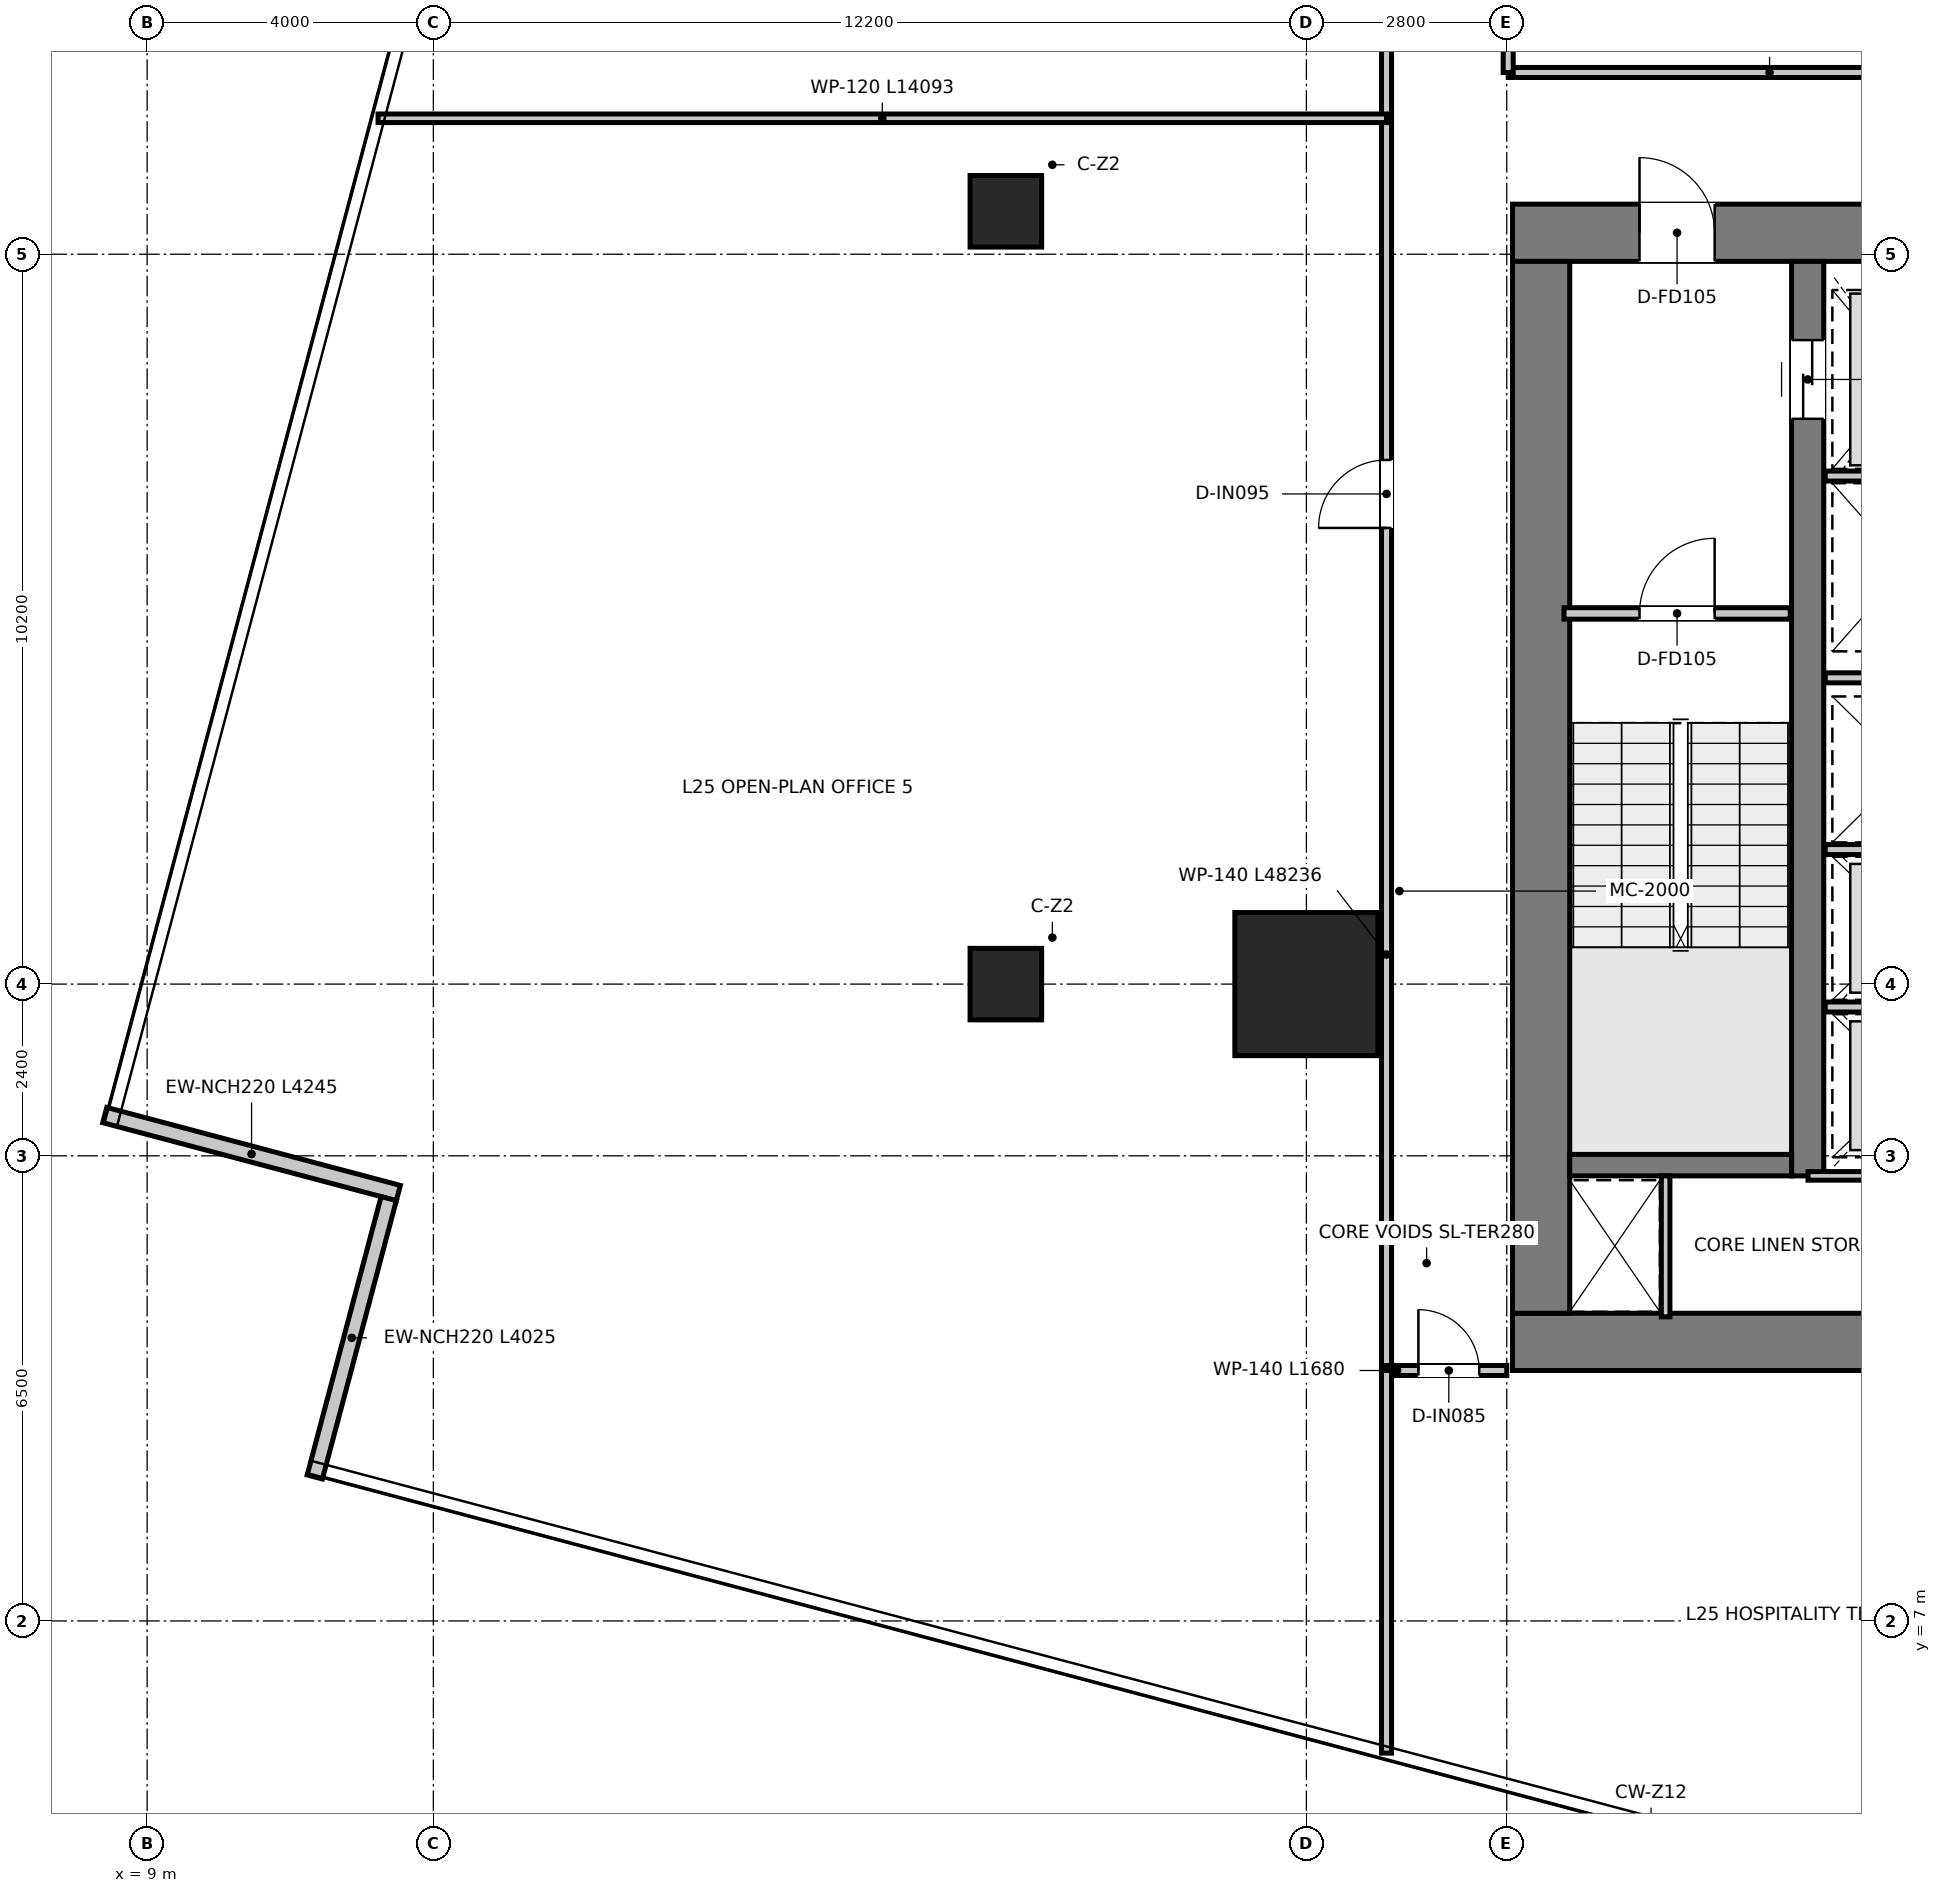
"""IFC4 building model, lengths in metres.
Left out: names, types, materials, properties, quantities, classifications, styles, units other than length and angle.
Written with IfcOpenShell. Run it as: python <this file> out.ifc"""

import sys

from ifc_helpers import new_model, si_unit, direction, frame, frame_2d, origin, origin_2d, place, context, subcontext, project, spatial, rectangle, extrude, source, transform, mapped, element, fill, save


model = new_model("IFC4")
c1 = context("Model", 3, precision=1e-05, world=origin(), true_north=direction((0.0, 1.0)))
c2 = subcontext(c1, "Body", "Model", "MODEL_VIEW")
j1 = project(units=[si_unit("LENGTHUNIT", "METRE"), si_unit("PLANEANGLEUNIT", "RADIAN")], contexts=[c1])
p1 = place(None, origin())
s1 = spatial("IfcSite", under=j1, at=p1, CompositionType="ELEMENT")
p2 = place(p1, origin())
s2 = spatial("IfcBuilding", under=s1, at=p2, CompositionType="ELEMENT")
p3 = place(p2, frame((0.0, 0.0, 105.85)))
s3 = spatial("IfcBuildingStorey", under=s2, at=p3, CompositionType="ELEMENT", Elevation=105.85)
p4 = place(p3, frame((28.08, 10.9, 0.0), z_axis=(0.0, 0.0, 1.0), x_axis=(1.0, 0.0, 0.0)))
e1 = element("IfcWall", 1, at=p4, inside=s3, PredefinedType="SHEAR", context=c2, shape_type="SweptSolid", body=[
    extrude(rectangle(XDim=15.84, YDim=0.8, at=frame_2d((7.92, 0.0))), origin(), (0.0, 0.0, 1.0), 3.95),
])
p5 = place(p3, frame((28.08, 26.4, 0.0), z_axis=(0.0, 0.0, 1.0), x_axis=(1.0, 0.0, 0.0)))
e2 = element("IfcWall", 2, at=p5, inside=s3, PredefinedType="SHEAR", context=c2, shape_type="SweptSolid", body=[
    extrude(rectangle(XDim=15.84, YDim=0.8, at=frame_2d((7.92, 0.0))), origin(), (0.0, 0.0, 1.0), 3.95),
])
p6 = place(p5, frame((7.22, 0.0, 0.0)))
e3 = element("IfcOpeningElement", 3, at=p6, cuts=e2, PredefinedType="OPENING", context=c2, shape_type="SweptSolid", body=[
    extrude(rectangle(XDim=1.4, YDim=2.2, at=frame_2d((0.7, 1.1))), frame((0.0, 0.41, 0.0), z_axis=(0.0, -1.0, 0.0), x_axis=(1.0, 0.0, 0.0)), (0.0, 0.0, 1.0), 0.82),
])
p7 = place(p5, frame((1.775, 0.0, 0.0)))
e4 = element("IfcOpeningElement", 4, at=p7, cuts=e2, PredefinedType="OPENING", context=c2, shape_type="SweptSolid", body=[
    extrude(rectangle(XDim=1.05, YDim=2.1, at=frame_2d((0.525, 1.05))), frame((0.0, 0.41, 0.0), z_axis=(0.0, -1.0, 0.0), x_axis=(1.0, 0.0, 0.0)), (0.0, 0.0, 1.0), 0.82),
])
p8 = place(p5, frame((13.015, 0.0, 0.0)))
e5 = element("IfcOpeningElement", 5, at=p8, cuts=e2, PredefinedType="OPENING", context=c2, shape_type="SweptSolid", body=[
    extrude(rectangle(XDim=1.05, YDim=2.1, at=frame_2d((0.525, 1.05))), frame((0.0, 0.41, 0.0), z_axis=(0.0, -1.0, 0.0), x_axis=(1.0, 0.0, 0.0)), (0.0, 0.0, 1.0), 0.82),
])
p9 = place(p3, frame((28.48, 11.3, 0.0), z_axis=(0.0, 0.0, 1.0), x_axis=(0.0, 1.0, 0.0)))
e6 = element("IfcWall", 6, at=p9, inside=s3, PredefinedType="SHEAR", context=c2, shape_type="SweptSolid", body=[
    extrude(rectangle(XDim=14.7, YDim=0.8, at=frame_2d((7.35, 0.0))), origin(), (0.0, 0.0, 1.0), 3.95),
])
p10 = place(p3, frame((32.205, 13.22, 0.0), z_axis=(0.0, 0.0, 1.0), x_axis=(0.0, 1.0, 0.0)))
e7 = element("IfcWall", 7, at=p10, inside=s3, PredefinedType="SHEAR", context=c2, shape_type="SweptSolid", body=[
    extrude(rectangle(XDim=12.78, YDim=0.45, at=frame_2d((6.39, 0.0))), origin(), (0.0, 0.0, 1.0), 3.95),
])
p11 = place(p10, frame((10.58, 0.0, 0.0)))
e8 = element("IfcOpeningElement", 8, at=p11, cuts=e7, PredefinedType="OPENING", context=c2, shape_type="SweptSolid", body=[
    extrude(rectangle(XDim=1.1, YDim=2.15, at=frame_2d((0.55, 1.075))), frame((0.0, 0.235, 0.0), z_axis=(0.0, -1.0, 0.0), x_axis=(1.0, 0.0, 0.0)), (0.0, 0.0, 1.0), 0.47),
])
p12 = place(p3, frame((28.88, 13.37, 0.0), z_axis=(0.0, 0.0, 1.0), x_axis=(1.0, 0.0, 0.0)))
e9 = element("IfcWall", 9, at=p12, inside=s3, PredefinedType="SHEAR", context=c2, shape_type="SweptSolid", body=[
    extrude(rectangle(XDim=3.1, YDim=0.3, at=frame_2d((1.55, 0.0))), origin(), (0.0, 0.0, 1.0), 3.95),
])
m1 = source(origin(), c2, "Body", "SweptSolid", [
    extrude(rectangle(XDim=2.0, YDim=2.0, at=origin_2d()), origin(), (0.0, 0.0, 1.0), 3.95),
])
p13 = place(p3, frame((25.2, 15.9, 0.0), z_axis=(0.0, 0.0, 1.0), x_axis=(1.0, 0.0, 0.0)))
e10 = element("IfcColumn", 10, at=p13, inside=s3, PredefinedType="USERDEFINED", context=c2, shape_type="MappedRepresentation", body=[
    mapped(m1, transform((0.0, 0.0, 0.0), x_axis=(1.0, 0.0, 0.0), y_axis=(0.0, 1.0, 0.0), z_axis=(0.0, 0.0, 1.0), scale=1.0)),
])
m2 = source(origin(), c2, "Body", "SweptSolid", [
    extrude(rectangle(XDim=1.0, YDim=1.0, at=origin_2d()), origin(), (0.0, 0.0, 1.0), 3.95),
])
for number, where, z_axis, x_axis in (
    (11, (21.0, 15.9, 0.0), (0.0, 0.0, 1.0), (1.0, 0.0, 0.0)),
    (12, (21.0, 26.7, 0.0), (0.0, 0.0, 1.0), (1.0, 0.0, 0.0)),
):
    element("IfcColumn", number, at=place(p3, frame(where, z_axis=z_axis, x_axis=x_axis)), inside=s3, PredefinedType="COLUMN", context=c2, shape_type="MappedRepresentation", body=[
        mapped(m2, transform((0.0, 0.0, 0.0), x_axis=(1.0, 0.0, 0.0), y_axis=(0.0, 1.0, 0.0), z_axis=(0.0, 0.0, 1.0), scale=1.0)),
    ])
p14 = place(p3, frame((8.408, 14.07, 0.0), z_axis=(0.0, 0.0, 1.0), x_axis=(0.966496943173, -0.256678123022, 0.0)))
e13 = element("IfcWall", 13, at=p14, inside=s3, PredefinedType="ELEMENTEDWALL", context=c2, shape_type="SweptSolid", body=[
    extrude(rectangle(XDim=4.245, YDim=0.22, at=frame_2d((2.123, 0.0))), origin(), (0.0, 0.0, 1.0), 3.67),
])
p15 = place(p3, frame((12.376, 12.902, 0.0), z_axis=(0.0, 0.0, 1.0), x_axis=(-0.256696053144, -0.966492181189, 0.0)))
e14 = element("IfcWall", 14, at=p15, inside=s3, PredefinedType="ELEMENTEDWALL", context=c2, shape_type="SweptSolid", body=[
    extrude(rectangle(XDim=4.025, YDim=0.22, at=frame_2d((2.012, 0.0))), origin(), (0.0, 0.0, 1.0), 3.67),
])
p16 = place(p3, frame((28.8, 21.08, 0.0), z_axis=(0.0, 0.0, 1.0), x_axis=(1.0, 0.0, 0.0)))
e15 = element("IfcWall", 15, at=p16, inside=s3, PredefinedType="PARTITIONING", context=c2, shape_type="SweptSolid", body=[
    extrude(rectangle(XDim=3.16, YDim=0.16, at=frame_2d((1.58, 0.0))), origin(), (0.0, 0.0, 1.0), 3.67),
])
p17 = place(p16, frame((1.055, 0.0, 0.0)))
e16 = element("IfcOpeningElement", 16, at=p17, cuts=e15, PredefinedType="OPENING", context=c2, shape_type="SweptSolid", body=[
    extrude(rectangle(XDim=1.05, YDim=2.1, at=frame_2d((0.525, 1.05))), frame((0.0, 0.09, 0.0), z_axis=(0.0, -1.0, 0.0), x_axis=(1.0, 0.0, 0.0)), (0.0, 0.0, 1.0), 0.18),
])
p18 = place(p3, frame((32.45, 23.0, 0.0), z_axis=(0.0, 0.0, 1.0), x_axis=(1.0, 0.0, 0.0)))
e17 = element("IfcWall", 17, at=p18, inside=s3, PredefinedType="PARTITIONING", context=c2, shape_type="SweptSolid", body=[
    extrude(rectangle(XDim=2.27, YDim=0.14, at=frame_2d((1.135, 0.0))), origin(), (0.0, 0.0, 1.0), 2.67),
])
for number, where, z_axis, x_axis in (
    (18, (32.45, 17.78, 0.0), (0.0, 0.0, 1.0), (1.0, 0.0, 0.0)),
    (19, (32.45, 20.18, 0.0), (0.0, 0.0, 1.0), (1.0, 0.0, 0.0)),
    (20, (32.45, 15.58, 0.0), (0.0, 0.0, 1.0), (1.0, 0.0, 0.0)),
):
    element("IfcWall", number, at=place(p3, frame(where, z_axis=z_axis, x_axis=x_axis)), inside=s3, PredefinedType="PARTITIONING", context=c2, shape_type="SweptSolid", body=[
        extrude(rectangle(XDim=2.27, YDim=0.14, at=frame_2d((1.135, 0.0))), origin(), (0.0, 0.0, 1.0), 3.67),
    ])
p19 = place(p3, frame((30.22, 11.25, 0.0), z_axis=(0.0, 0.0, 1.0), x_axis=(0.0, 1.0, 0.0)))
e21 = element("IfcWall", 21, at=p19, inside=s3, PredefinedType="PARTITIONING", context=c2, shape_type="SweptSolid", body=[
    extrude(rectangle(XDim=1.97, YDim=0.12, at=frame_2d((0.985, 0.0))), origin(), (0.0, 0.0, 1.0), 3.67),
])
p20 = place(p3, frame((32.21, 13.22, 0.0), z_axis=(0.0, 0.0, 1.0), x_axis=(1.0, 0.0, 0.0)))
e22 = element("IfcWall", 22, at=p20, inside=s3, PredefinedType="PARTITIONING", context=c2, shape_type="SweptSolid", body=[
    extrude(rectangle(XDim=7.58, YDim=0.12, at=frame_2d((3.79, 0.0))), origin(), (0.0, 0.0, 1.0), 3.67),
])
p21 = place(p20, frame((3.365, 0.0, 0.0)))
e23 = element("IfcOpeningElement", 23, at=p21, cuts=e22, PredefinedType="OPENING", context=c2, shape_type="SweptSolid", body=[
    extrude(rectangle(XDim=0.85, YDim=2.1, at=frame_2d((0.425, 1.05))), frame((0.0, 0.07, 0.0), z_axis=(0.0, -1.0, 0.0), x_axis=(1.0, 0.0, 0.0)), (0.0, 0.0, 1.0), 0.14),
])
p22 = place(p3, frame((28.02, 28.64, 0.0), z_axis=(0.0, 0.0, 1.0), x_axis=(1.0, 0.0, 0.0)))
e24 = element("IfcWall", 24, at=p22, inside=s3, PredefinedType="PARTITIONING", context=c2, shape_type="SweptSolid", body=[
    extrude(rectangle(XDim=15.96, YDim=0.14, at=frame_2d((7.98, 0.0))), origin(), (0.0, 0.0, 1.0), 3.08),
])
p23 = place(p22, frame((7.455, 0.0, 0.0)))
e25 = element("IfcOpeningElement", 25, at=p23, cuts=e24, PredefinedType="OPENING", context=c2, shape_type="SweptSolid", body=[
    extrude(rectangle(XDim=1.05, YDim=2.15, at=frame_2d((0.525, 1.075))), frame((0.0, 0.08, 0.0), z_axis=(0.0, -1.0, 0.0), x_axis=(1.0, 0.0, 0.0)), (0.0, 0.0, 1.0), 0.16),
])
p24 = place(p3, frame((28.02, 28.64, 0.0), z_axis=(0.0, 0.0, 1.0), x_axis=(0.0, 1.0, 0.0)))
e26 = element("IfcWall", 26, at=p24, inside=s3, PredefinedType="PARTITIONING", context=c2, shape_type="SweptSolid", body=[
    extrude(rectangle(XDim=5.74, YDim=0.14, at=frame_2d((2.87, 0.0))), origin(), (0.0, 0.0, 1.0), 3.27),
])
p25 = place(p3, frame((26.32, 10.5, 0.0), z_axis=(0.0, 0.0, 1.0), x_axis=(0.0, 1.0, 0.0)))
e27 = element("IfcWall", 27, at=p25, inside=s3, PredefinedType="PARTITIONING", context=c2, shape_type="SweptSolid", body=[
    extrude(rectangle(XDim=25.62, YDim=0.14, at=frame_2d((12.81, 0.0))), origin(), (0.0, 0.0, 1.0), 2.97),
])
p26 = place(p25, frame((11.775, 0.0, 0.0)))
e28 = element("IfcOpeningElement", 28, at=p26, cuts=e27, PredefinedType="OPENING", context=c2, shape_type="SweptSolid", body=[
    extrude(rectangle(XDim=0.95, YDim=2.1, at=frame_2d((0.475, 1.05))), frame((0.0, 0.08, 0.0), z_axis=(0.0, -1.0, 0.0), x_axis=(1.0, 0.0, 0.0)), (0.0, 0.0, 1.0), 0.16),
])
p27 = place(p25, frame((20.375, 0.0, 0.0)))
e29 = element("IfcOpeningElement", 29, at=p27, cuts=e27, PredefinedType="OPENING", context=c2, shape_type="SweptSolid", body=[
    extrude(rectangle(XDim=0.95, YDim=2.1, at=frame_2d((0.475, 1.05))), frame((0.0, 0.08, 0.0), z_axis=(0.0, -1.0, 0.0), x_axis=(1.0, 0.0, 0.0)), (0.0, 0.0, 1.0), 0.16),
])
p28 = place(p3, frame((26.32, 10.5, 0.0), z_axis=(0.0, 0.0, 1.0), x_axis=(1.0, 0.0, 0.0)))
e30 = element("IfcWall", 30, at=p28, inside=s3, PredefinedType="PARTITIONING", context=c2, shape_type="SweptSolid", body=[
    extrude(rectangle(XDim=1.68, YDim=0.14, at=frame_2d((0.84, 0.0))), origin(), (0.0, 0.0, 1.0), 3.67),
])
p29 = place(p28, frame((0.445, 0.0, 0.0)))
e31 = element("IfcOpeningElement", 31, at=p29, cuts=e30, PredefinedType="OPENING", context=c2, shape_type="SweptSolid", body=[
    extrude(rectangle(XDim=0.85, YDim=2.1, at=frame_2d((0.425, 1.05))), frame((0.0, 0.08, 0.0), z_axis=(0.0, -1.0, 0.0), x_axis=(1.0, 0.0, 0.0)), (0.0, 0.0, 1.0), 0.16),
])
p30 = place(p3, frame((26.32, 5.153, 0.0), z_axis=(0.0, 0.0, 1.0), x_axis=(0.0, 1.0, 0.0)))
e32 = element("IfcWall", 32, at=p30, inside=s3, PredefinedType="PARTITIONING", context=c2, shape_type="SweptSolid", body=[
    extrude(rectangle(XDim=5.347, YDim=0.14, at=frame_2d((2.674, 0.0))), origin(), (0.0, 0.0, 1.0), 3.67),
])
p31 = place(p3, frame((12.227, 28.0, 0.0), z_axis=(0.0, 0.0, 1.0), x_axis=(1.0, 0.0, 0.0)))
e33 = element("IfcWall", 33, at=p31, inside=s3, PredefinedType="PARTITIONING", context=c2, shape_type="SweptSolid", body=[
    extrude(rectangle(XDim=14.093, YDim=0.12, at=frame_2d((7.046, 0.0))), origin(), (0.0, 0.0, 1.0), 2.97),
])
p32 = place(p17, origin())
e34 = element("IfcDoor", 34, at=p32, inside=s3, OperationType="SINGLE_SWING_RIGHT", PredefinedType="DOOR", context=c2, shape_type="SweptSolid", body=[
    extrude(rectangle(XDim=1.05, YDim=2.1, at=frame_2d((0.525, 1.05))), frame((0.0, 0.025, 0.0), z_axis=(0.0, -1.0, 0.0), x_axis=(1.0, 0.0, 0.0)), (0.0, 0.0, 1.0), 0.05),
])
fill(e16, e34)
p33 = place(p7, origin())
e35 = element("IfcDoor", 35, at=p33, inside=s3, OperationType="SINGLE_SWING_LEFT", PredefinedType="DOOR", context=c2, shape_type="SweptSolid", body=[
    extrude(rectangle(XDim=1.05, YDim=2.1, at=frame_2d((0.525, 1.05))), frame((0.0, 0.025, 0.0), z_axis=(0.0, -1.0, 0.0), x_axis=(1.0, 0.0, 0.0)), (0.0, 0.0, 1.0), 0.05),
])
fill(e4, e35)
p34 = place(p11, origin())
e36 = element("IfcDoor", 36, at=p34, inside=s3, OperationType="DOUBLE_DOOR_SLIDING", PredefinedType="DOOR", context=c2, shape_type="SweptSolid", body=[
    extrude(rectangle(XDim=1.1, YDim=2.15, at=frame_2d((0.55, 1.075))), frame((0.0, 0.025, 0.0), z_axis=(0.0, -1.0, 0.0), x_axis=(1.0, 0.0, 0.0)), (0.0, 0.0, 1.0), 0.05),
])
fill(e8, e36)
p35 = place(p26, origin())
e37 = element("IfcDoor", 37, at=p35, inside=s3, OperationType="SINGLE_SWING_LEFT", PredefinedType="DOOR", context=c2, shape_type="SweptSolid", body=[
    extrude(rectangle(XDim=0.95, YDim=2.1, at=frame_2d((0.475, 1.05))), frame((0.0, 0.025, 0.0), z_axis=(0.0, -1.0, 0.0), x_axis=(1.0, 0.0, 0.0)), (0.0, 0.0, 1.0), 0.05),
])
fill(e28, e37)
p36 = place(p29, origin())
e38 = element("IfcDoor", 38, at=p36, inside=s3, OperationType="SINGLE_SWING_LEFT", PredefinedType="DOOR", context=c2, shape_type="SweptSolid", body=[
    extrude(rectangle(XDim=0.85, YDim=2.1, at=frame_2d((0.425, 1.05))), frame((0.0, 0.025, 0.0), z_axis=(0.0, -1.0, 0.0), x_axis=(1.0, 0.0, 0.0)), (0.0, 0.0, 1.0), 0.05),
])
fill(e31, e38)
save(model, sys.argv[1])
